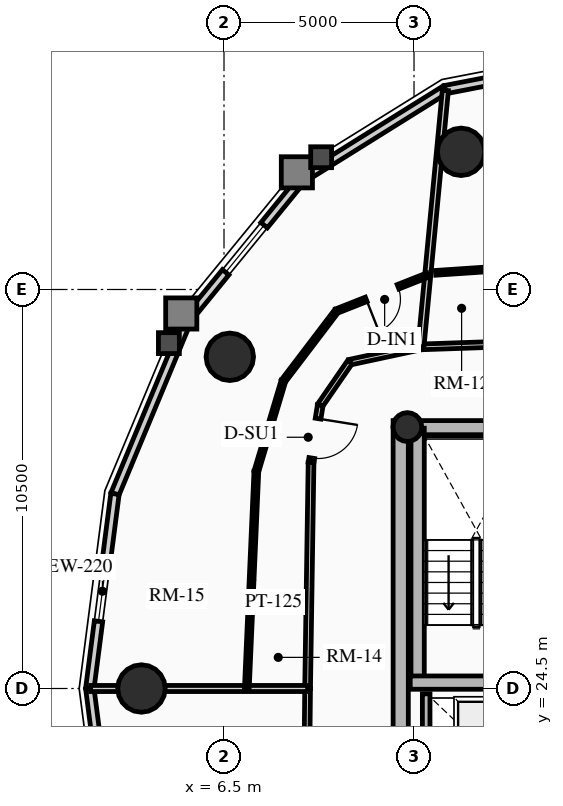
"""IFC4 building model, lengths in metres.
Left out: names, types, materials, properties, quantities, classifications, styles, units other than length and angle.
Written with IfcOpenShell. Run it as: python <this file> out.ifc"""

import sys

from ifc_helpers import new_model, si_unit, direction, frame, frame_2d, origin, origin_2d, place, context, subcontext, project, spatial, rectangle, circle, hollow_circle, extrude, source, transform, mapped, element, fill, save


model = new_model("IFC4")
c1 = context("Model", 3, precision=1e-05, world=origin(), true_north=direction((0.0, 1.0)))
c2 = subcontext(c1, "Body", "Model", "MODEL_VIEW")
j1 = project(units=[si_unit("LENGTHUNIT", "METRE"), si_unit("PLANEANGLEUNIT", "RADIAN")], contexts=[c1])
p1 = place(None, origin())
s1 = spatial("IfcSite", under=j1, at=p1, CompositionType="ELEMENT")
p2 = place(p1, origin())
s2 = spatial("IfcBuilding", under=s1, at=p2, CompositionType="ELEMENT")
p3 = place(p2, frame((0.0, 0.0, 177.79)))
s3 = spatial("IfcBuildingStorey", under=s2, at=p3, CompositionType="ELEMENT", Elevation=177.79)
p4 = place(p3, frame((11.15, 17.45, 0.0), z_axis=(0.0, 0.0, 1.0), x_axis=(0.0, 1.0, 0.0)))
e1 = element("IfcWall", 1, at=p4, inside=s3, PredefinedType="SHEAR", context=c2, shape_type="SweptSolid", body=[
    extrude(rectangle(XDim=14.1, YDim=0.4, at=frame_2d((7.05, 0.0))), origin(), (0.0, 0.0, 1.0), 2.91),
])
p5 = place(p3, frame((11.15, 31.35, 0.0), z_axis=(0.0, 0.0, 1.0), x_axis=(1.0, 0.0, 0.0)))
e2 = element("IfcWall", 2, at=p5, inside=s3, PredefinedType="SHEAR", context=c2, shape_type="SweptSolid", body=[
    extrude(rectangle(XDim=10.7, YDim=0.4, at=frame_2d((5.35, 0.0))), origin(), (0.0, 0.0, 1.0), 2.91),
])
m1 = source(origin(), c2, "Body", "SweptSolid", [
    extrude(rectangle(XDim=1.5, YDim=2.02, at=frame_2d((0.75, 1.01))), frame((0.0, 0.21, 0.0), z_axis=(0.0, -1.0, 0.0), x_axis=(1.0, 0.0, 0.0)), (0.0, 0.0, 1.0), 0.42),
])
p6 = place(p5, frame((4.6, 0.0, 0.0)))
e3 = element("IfcOpeningElement", 3, at=p6, cuts=e2, PredefinedType="OPENING", context=c2, shape_type="MappedRepresentation", body=[
    mapped(m1, transform((0.0, 0.0, 0.0), x_axis=(1.0, 0.0, 0.0), y_axis=(0.0, 1.0, 0.0), z_axis=(0.0, 0.0, 1.0), scale=1.0)),
])
p7 = place(p3, frame((11.595, 24.655, 0.0), z_axis=(0.0, 0.0, 1.0), x_axis=(0.0, 1.0, 0.0)))
e4 = element("IfcWall", 4, at=p7, inside=s3, PredefinedType="SHEAR", context=c2, shape_type="SweptSolid", body=[
    extrude(rectangle(XDim=6.695, YDim=0.35, at=frame_2d((3.348, 0.0))), origin(), (0.0, 0.0, 1.0), 2.91),
])
p8 = place(p3, frame((11.4, 24.655, 0.0), z_axis=(0.0, 0.0, 1.0), x_axis=(1.0, 0.0, 0.0)))
e5 = element("IfcWall", 5, at=p8, inside=s3, PredefinedType="SHEAR", context=c2, shape_type="SweptSolid", body=[
    extrude(rectangle(XDim=3.285, YDim=0.35, at=frame_2d((1.643, 0.0))), origin(), (0.0, 0.0, 1.0), 2.91),
])
p9 = place(p3, frame((11.325, 31.38, 0.0), z_axis=(0.0, 0.0, 1.0), x_axis=(1.0, 0.0, 0.0)))
e6 = element("IfcColumn", 6, at=p9, inside=s3, PredefinedType="COLUMN", context=c2, shape_type="SweptSolid", body=[
    extrude(hollow_circle(Radius=0.38, WallThickness=0.032, at=origin_2d()), origin(), (0.0, 0.0, 1.0), 2.91),
])
for number, where, z_axis, x_axis in (
    (7, (12.739, 38.623, 0.0), (0.0, 0.0, 1.0), (1.0, 0.0, 0.0)),
    (8, (6.653, 33.229, 0.0), (0.0, 0.0, 1.0), (1.0, 0.0, 0.0)),
    (9, (4.328, 24.5, 0.0), (0.0, 0.0, 1.0), (1.0, 0.0, 0.0)),
):
    element("IfcColumn", number, at=place(p3, frame(where, z_axis=z_axis, x_axis=x_axis)), inside=s3, PredefinedType="USERDEFINED", context=c2, shape_type="SweptSolid", body=[
        extrude(circle(Radius=0.625, at=origin_2d()), origin(), (0.0, 0.0, 1.0), 2.91),
    ])
p10 = place(p3, frame((12.319, 40.259, 0.0), z_axis=(0.0, 0.0, 1.0), x_axis=(0.981703883443, 0.190413983815, 0.0)))
e10 = element("IfcWall", 10, at=p10, inside=s3, PredefinedType="SOLIDWALL", context=c2, shape_type="SweptSolid", body=[
    extrude(rectangle(XDim=4.259, YDim=0.22, at=frame_2d((2.13, 0.0))), origin(), (0.0, 0.0, 1.0), 2.245),
])
m2 = source(origin(), c2, "Body", "SweptSolid", [
    extrude(rectangle(XDim=1.6, YDim=1.3, at=frame_2d((0.8, 0.65))), frame((0.0, 0.12, 0.0), z_axis=(0.0, -1.0, 0.0), x_axis=(1.0, 0.0, 0.0)), (0.0, 0.0, 1.0), 0.24),
])
p11 = place(p10, frame((1.33, 0.0, 0.65)))
e11 = element("IfcOpeningElement", 11, at=p11, cuts=e10, PredefinedType="OPENING", context=c2, shape_type="MappedRepresentation", body=[
    mapped(m2, transform((0.0, 0.0, 0.0), x_axis=(1.0, 0.0, 0.0), y_axis=(0.0, 1.0, 0.0), z_axis=(0.0, 0.0, 1.0), scale=1.0)),
])
p12 = place(p3, frame((8.547, 37.906, 0.0), z_axis=(0.0, 0.0, 1.0), x_axis=(0.848399108042, 0.529357113368, 0.0)))
e12 = element("IfcWall", 12, at=p12, inside=s3, PredefinedType="SOLIDWALL", context=c2, shape_type="SweptSolid", body=[
    extrude(rectangle(XDim=4.446, YDim=0.22, at=frame_2d((2.223, 0.0))), origin(), (0.0, 0.0, 1.0), 2.245),
])
p13 = place(p3, frame((5.553, 34.24, 0.0), z_axis=(0.0, 0.0, 1.0), x_axis=(0.632470615287, 0.774584353572, 0.0)))
e13 = element("IfcWall", 13, at=p13, inside=s3, PredefinedType="SOLIDWALL", context=c2, shape_type="SweptSolid", body=[
    extrude(rectangle(XDim=4.733, YDim=0.22, at=frame_2d((2.366, 0.0))), origin(), (0.0, 0.0, 1.0), 2.245),
])
p14 = place(p13, frame((1.566, 0.0, 0.65)))
e14 = element("IfcOpeningElement", 14, at=p14, cuts=e13, PredefinedType="OPENING", context=c2, shape_type="MappedRepresentation", body=[
    mapped(m2, transform((0.0, 0.0, 0.0), x_axis=(1.0, 0.0, 0.0), y_axis=(0.0, 1.0, 0.0), z_axis=(0.0, 0.0, 1.0), scale=1.0)),
])
p15 = place(p3, frame((3.631, 29.62, 0.0), z_axis=(0.0, 0.0, 1.0), x_axis=(0.384144094086, 0.923273152961, 0.0)))
e15 = element("IfcWall", 15, at=p15, inside=s3, PredefinedType="SOLIDWALL", context=c2, shape_type="SweptSolid", body=[
    extrude(rectangle(XDim=5.003, YDim=0.22, at=frame_2d((2.501, 0.0))), origin(), (0.0, 0.0, 1.0), 2.245),
])
p16 = place(p3, frame((2.969, 24.5, 0.0), z_axis=(0.0, 0.0, 1.0), x_axis=(0.128287912609, 0.991736966881, 0.0)))
e16 = element("IfcWall", 16, at=p16, inside=s3, PredefinedType="SOLIDWALL", context=c2, shape_type="SweptSolid", body=[
    extrude(rectangle(XDim=5.163, YDim=0.22, at=frame_2d((2.582, 0.0))), origin(), (0.0, 0.0, 1.0), 2.245),
])
p17 = place(p16, frame((1.782, 0.0, 0.65)))
e17 = element("IfcOpeningElement", 17, at=p17, cuts=e16, PredefinedType="OPENING", context=c2, shape_type="MappedRepresentation", body=[
    mapped(m2, transform((0.0, 0.0, 0.0), x_axis=(1.0, 0.0, 0.0), y_axis=(0.0, 1.0, 0.0), z_axis=(0.0, 0.0, 1.0), scale=1.0)),
])
p18 = place(p3, frame((3.631, 19.38, 0.0), z_axis=(0.0, 0.0, 1.0), x_axis=(-0.128287912609, 0.991736966881, 0.0)))
e18 = element("IfcWall", 18, at=p18, inside=s3, PredefinedType="SOLIDWALL", context=c2, shape_type="SweptSolid", body=[
    extrude(rectangle(XDim=5.163, YDim=0.22, at=frame_2d((2.582, 0.0))), origin(), (0.0, 0.0, 1.0), 2.245),
])
p19 = place(p3, frame((11.82, 21.92, 0.0), z_axis=(0.0, 0.0, 1.0), x_axis=(0.0, 1.0, 0.0)))
e19 = element("IfcWall", 19, at=p19, inside=s3, PredefinedType="SHEAR", context=c2, shape_type="SweptSolid", body=[
    extrude(rectangle(XDim=2.44, YDim=0.2, at=frame_2d((1.22, 0.0))), origin(), (0.0, 0.0, 1.0), 2.91),
])
p20 = place(p3, frame((18.123, 33.709, 0.0), z_axis=(0.0, 0.0, 1.0), x_axis=(-0.999417459976, -0.034128297572, 0.0)))
e20 = element("IfcWall", 20, at=p20, inside=s3, PredefinedType="PARTITIONING", context=c2, shape_type="SweptSolid", body=[
    extrude(rectangle(XDim=6.445, YDim=0.15, at=frame_2d((3.223, 0.0))), origin(), (0.0, 0.0, 1.0), 2.245),
])
p21 = place(p3, frame((11.681, 33.49, 0.0), z_axis=(0.0, 0.0, 1.0), x_axis=(-0.977628265995, -0.2103401377, 0.0)))
e21 = element("IfcWall", 21, at=p21, inside=s3, PredefinedType="PARTITIONING", context=c2, shape_type="SweptSolid", body=[
    extrude(rectangle(XDim=1.912, YDim=0.15, at=frame_2d((0.956, 0.0))), origin(), (0.0, 0.0, 1.0), 2.245),
])
p22 = place(p3, frame((9.812, 33.087, 0.0), z_axis=(0.0, 0.0, 1.0), x_axis=(-0.567811958729, -0.823158295545, 0.0)))
e22 = element("IfcWall", 22, at=p22, inside=s3, PredefinedType="PARTITIONING", context=c2, shape_type="SweptSolid", body=[
    extrude(rectangle(XDim=1.372, YDim=0.15, at=frame_2d((0.686, 0.0))), origin(), (0.0, 0.0, 1.0), 2.245),
])
p23 = place(p3, frame((9.033, 31.958, 0.0), z_axis=(0.0, 0.0, 1.0), x_axis=(-0.158344987388, -0.98738384885, 0.0)))
e23 = element("IfcWall", 23, at=p23, inside=s3, PredefinedType="PARTITIONING", context=c2, shape_type="SweptSolid", body=[
    extrude(rectangle(XDim=1.531, YDim=0.15, at=frame_2d((0.766, 0.0))), origin(), (0.0, 0.0, 1.0), 2.245),
])
m3 = source(origin(), c2, "Body", "SweptSolid", [
    extrude(rectangle(XDim=1.05, YDim=2.015, at=frame_2d((0.525, 1.007))), frame((0.0, 0.085, 0.0), z_axis=(0.0, -1.0, 0.0), x_axis=(1.0, 0.0, 0.0)), (0.0, 0.0, 1.0), 0.17),
])
p24 = place(p23, frame((0.361, 0.0, 0.0)))
e24 = element("IfcOpeningElement", 24, at=p24, cuts=e23, PredefinedType="OPENING", context=c2, shape_type="MappedRepresentation", body=[
    mapped(m3, transform((0.0, 0.0, 0.0), x_axis=(1.0, 0.0, 0.0), y_axis=(0.0, 1.0, 0.0), z_axis=(0.0, 0.0, 1.0), scale=1.0)),
])
p25 = place(p3, frame((8.791, 30.446, 0.0), z_axis=(0.0, 0.0, 1.0), x_axis=(-0.015230619426, -0.999884007389, 0.0)))
e25 = element("IfcWall", 25, at=p25, inside=s3, PredefinedType="PARTITIONING", context=c2, shape_type="SweptSolid", body=[
    extrude(rectangle(XDim=5.947, YDim=0.15, at=frame_2d((2.974, 0.0))), origin(), (0.0, 0.0, 1.0), 2.675),
])
p26 = place(p3, frame((8.7, 24.5, 0.0), z_axis=(0.0, 0.0, 1.0), x_axis=(-0.010507512335, -0.999944794568, 0.0)))
e26 = element("IfcWall", 26, at=p26, inside=s3, PredefinedType="PARTITIONING", context=c2, shape_type="SweptSolid", body=[
    extrude(rectangle(XDim=6.064, YDim=0.15, at=frame_2d((3.032, 0.0))), origin(), (0.0, 0.0, 1.0), 2.245),
])
p27 = place(p3, frame((11.681, 33.49, 0.0), z_axis=(0.0, 0.0, 1.0), x_axis=(0.094975594504, 0.995479601222, 0.0)))
e27 = element("IfcWall", 27, at=p27, inside=s3, PredefinedType="PARTITIONING", context=c2, shape_type="SweptSolid", body=[
    extrude(rectangle(XDim=6.781, YDim=0.16, at=frame_2d((3.391, 0.0))), origin(), (0.0, 0.0, 1.0), 2.245),
])
p28 = place(p3, frame((8.7, 24.5, 0.0), z_axis=(0.0, 0.0, 1.0), x_axis=(-1.0, 0.0, 0.0)))
e28 = element("IfcWall", 28, at=p28, inside=s3, PredefinedType="PARTITIONING", context=c2, shape_type="SweptSolid", body=[
    extrude(rectangle(XDim=5.711, YDim=0.16, at=frame_2d((2.855, 0.0))), origin(), (0.0, 0.0, 1.0), 2.245),
])
p29 = place(p3, frame((14.848, 35.625, 0.0), z_axis=(0.0, 0.0, 1.0), x_axis=(-0.997750908336, -0.067030775874, 0.0)))
e29 = element("IfcWall", 29, at=p29, inside=s3, PredefinedType="PARTITIONING", context=c2, shape_type="SweptSolid", body=[
    extrude(rectangle(XDim=2.786, YDim=0.125, at=frame_2d((1.393, 0.0))), origin(), (0.0, 0.0, 1.0), 2.245),
])
m4 = source(origin(), c2, "Body", "SweptSolid", [
    extrude(rectangle(XDim=0.9, YDim=2.005, at=frame_2d((0.45, 1.002))), frame((0.0, 0.073, 0.0), z_axis=(0.0, -1.0, 0.0), x_axis=(1.0, 0.0, 0.0)), (0.0, 0.0, 1.0), 0.145),
])
p30 = place(p29, frame((0.12, 0.0, 0.0)))
e30 = element("IfcOpeningElement", 30, at=p30, cuts=e29, PredefinedType="OPENING", context=c2, shape_type="MappedRepresentation", body=[
    mapped(m4, transform((0.0, 0.0, 0.0), x_axis=(1.0, 0.0, 0.0), y_axis=(0.0, 1.0, 0.0), z_axis=(0.0, 0.0, 1.0), scale=1.0)),
])
p31 = place(p3, frame((11.861, 35.38, 0.0), z_axis=(0.0, 0.0, 1.0), x_axis=(-0.930124609977, -0.367244074037, 0.0)))
e31 = element("IfcWall", 31, at=p31, inside=s3, PredefinedType="PARTITIONING", context=c2, shape_type="SweptSolid", body=[
    extrude(rectangle(XDim=2.581, YDim=0.125, at=frame_2d((1.291, 0.0))), origin(), (0.0, 0.0, 1.0), 2.245),
])
p32 = place(p31, frame((0.84, 0.0, 0.0)))
e32 = element("IfcOpeningElement", 32, at=p32, cuts=e31, PredefinedType="OPENING", context=c2, shape_type="MappedRepresentation", body=[
    mapped(m4, transform((0.0, 0.0, 0.0), x_axis=(1.0, 0.0, 0.0), y_axis=(0.0, 1.0, 0.0), z_axis=(0.0, 0.0, 1.0), scale=1.0)),
])
p33 = place(p3, frame((9.461, 34.432, 0.0), z_axis=(0.0, 0.0, 1.0), x_axis=(-0.605297668278, -0.795999204005, 0.0)))
e33 = element("IfcWall", 33, at=p33, inside=s3, PredefinedType="PARTITIONING", context=c2, shape_type="SweptSolid", body=[
    extrude(rectangle(XDim=2.31, YDim=0.125, at=frame_2d((1.155, 0.0))), origin(), (0.0, 0.0, 1.0), 2.245),
])
p34 = place(p3, frame((8.063, 32.594, 0.0), z_axis=(0.0, 0.0, 1.0), x_axis=(-0.286473203627, -0.958088254601, 0.0)))
e34 = element("IfcWall", 34, at=p34, inside=s3, PredefinedType="PARTITIONING", context=c2, shape_type="SweptSolid", body=[
    extrude(rectangle(XDim=2.484, YDim=0.125, at=frame_2d((1.242, 0.0))), origin(), (0.0, 0.0, 1.0), 2.245),
])
p35 = place(p3, frame((7.351, 30.213, 0.0), z_axis=(0.0, 0.0, 1.0), x_axis=(-0.043800331293, -0.999040304982, 0.0)))
e35 = element("IfcWall", 35, at=p35, inside=s3, PredefinedType="PARTITIONING", context=c2, shape_type="SweptSolid", body=[
    extrude(rectangle(XDim=5.719, YDim=0.125, at=frame_2d((2.859, 0.0))), origin(), (0.0, 0.0, 1.0), 2.675),
])
m5 = source(origin(), c2, "Body", "SweptSolid", [
    extrude(rectangle(XDim=1.6, YDim=1.3, at=frame_2d((0.8, 0.65))), frame((0.0, 0.03, 0.0), z_axis=(0.0, -1.0, 0.0), x_axis=(1.0, 0.0, 0.0)), (0.0, 0.0, 1.0), 0.06),
])
p36 = place(p14, origin())
e36 = element("IfcWindow", 36, at=p36, inside=s3, PartitioningType="SINGLE_PANEL", PredefinedType="WINDOW", context=c2, shape_type="MappedRepresentation", body=[
    mapped(m5, transform((0.0, 0.0, 0.0), x_axis=(1.0, 0.0, 0.0), y_axis=(0.0, 1.0, 0.0), z_axis=(0.0, 0.0, 1.0), scale=1.0)),
])
fill(e14, e36)
p37 = place(p17, origin())
e37 = element("IfcWindow", 37, at=p37, inside=s3, PartitioningType="SINGLE_PANEL", PredefinedType="WINDOW", context=c2, shape_type="MappedRepresentation", body=[
    mapped(m5, transform((0.0, 0.0, 0.0), x_axis=(1.0, 0.0, 0.0), y_axis=(0.0, 1.0, 0.0), z_axis=(0.0, 0.0, 1.0), scale=1.0)),
])
fill(e17, e37)
m6 = source(origin(), c2, "Body", "SweptSolid", [
    extrude(rectangle(XDim=1.05, YDim=2.015, at=frame_2d((0.525, 1.007))), frame((0.0, 0.025, 0.0), z_axis=(0.0, -1.0, 0.0), x_axis=(1.0, 0.0, 0.0)), (0.0, 0.0, 1.0), 0.05),
])
p38 = place(p24, origin())
e38 = element("IfcDoor", 38, at=p38, inside=s3, OperationType="SINGLE_SWING_LEFT", PredefinedType="DOOR", context=c2, shape_type="MappedRepresentation", body=[
    mapped(m6, transform((0.0, 0.0, 0.0), x_axis=(1.0, 0.0, 0.0), y_axis=(0.0, 1.0, 0.0), z_axis=(0.0, 0.0, 1.0), scale=1.0)),
])
fill(e24, e38)
m7 = source(origin(), c2, "Body", "SweptSolid", [
    extrude(rectangle(XDim=0.9, YDim=2.005, at=frame_2d((0.45, 1.002))), frame((0.0, 0.025, 0.0), z_axis=(0.0, -1.0, 0.0), x_axis=(1.0, 0.0, 0.0)), (0.0, 0.0, 1.0), 0.05),
])
p39 = place(p32, origin())
e39 = element("IfcDoor", 39, at=p39, inside=s3, OperationType="SINGLE_SWING_RIGHT", PredefinedType="DOOR", context=c2, shape_type="MappedRepresentation", body=[
    mapped(m7, transform((0.0, 0.0, 0.0), x_axis=(1.0, 0.0, 0.0), y_axis=(0.0, 1.0, 0.0), z_axis=(0.0, 0.0, 1.0), scale=1.0)),
])
fill(e32, e39)
save(model, sys.argv[1])
